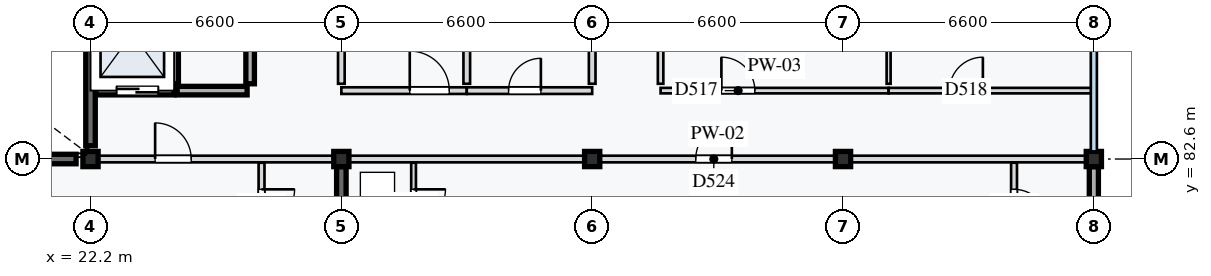
"""IFC4 building model, lengths in metres.
Left out: names, types, materials, properties, quantities, classifications, styles, units other than length and angle.
Written with IfcOpenShell. Run it as: python <this file> out.ifc"""

import sys

from ifc_helpers import new_model, si_unit, direction, frame, frame_2d, origin, origin_2d, place, context, subcontext, project, spatial, rectangle, extrude, element, fill, save


model = new_model("IFC4")
c1 = context("Model", 3, precision=1e-05, world=origin(), true_north=direction((0.0, 1.0)))
c2 = subcontext(c1, "Body", "Model", "MODEL_VIEW")
j1 = project(units=[si_unit("LENGTHUNIT", "METRE"), si_unit("PLANEANGLEUNIT", "RADIAN")], contexts=[c1])
p1 = place(None, origin())
s1 = spatial("IfcSite", under=j1, at=p1, CompositionType="ELEMENT")
p2 = place(p1, origin())
s2 = spatial("IfcBuilding", under=s1, at=p2, CompositionType="ELEMENT")
p3 = place(p2, frame((0.0, 0.0, 53.2)))
s3 = spatial("IfcBuildingStorey", under=s2, at=p3, CompositionType="ELEMENT", Elevation=53.2)
for number, where, z_axis, x_axis in (
    (1, (22.2, 82.6, 0.0), (0.0, 0.0, 1.0), (1.0, 0.0, 0.0)),
    (2, (28.8, 82.6, 0.0), (0.0, 0.0, 1.0), (1.0, 0.0, 0.0)),
    (3, (35.4, 82.6, 0.0), (0.0, 0.0, 1.0), (1.0, 0.0, 0.0)),
    (4, (42.0, 82.6, 0.0), (0.0, 0.0, 1.0), (1.0, 0.0, 0.0)),
    (5, (48.6, 82.6, 0.0), (0.0, 0.0, 1.0), (1.0, 0.0, 0.0)),
):
    element("IfcColumn", number, at=place(p3, frame(where, z_axis=z_axis, x_axis=x_axis)), inside=s3, PredefinedType="COLUMN", context=c2, shape_type="SweptSolid", body=[
        extrude(rectangle(XDim=0.4, YDim=0.4, at=origin_2d()), origin(), (0.0, 0.0, 1.0), 3.2),
    ])
p4 = place(p3, frame((15.98, 82.6, 0.0), z_axis=(0.0, 0.0, 1.0), x_axis=(1.0, 0.0, 0.0)))
e6 = element("IfcWall", 6, at=p4, inside=s3, PredefinedType="SHEAR", context=c2, shape_type="SweptSolid", body=[
    extrude(rectangle(XDim=5.84, YDim=0.25, at=frame_2d((2.92, 0.0))), origin(), (0.0, 0.0, 1.0), 2.98),
])
p5 = place(p3, frame((22.2, 82.95, 0.0), z_axis=(0.0, 0.0, 1.0), x_axis=(0.0, 1.0, 0.0)))
e7 = element("IfcWall", 7, at=p5, inside=s3, PredefinedType="SHEAR", context=c2, shape_type="SweptSolid", body=[
    extrude(rectangle(XDim=2.8, YDim=0.25, at=frame_2d((1.4, 0.0))), origin(), (0.0, 0.0, 1.0), 2.98),
])
p6 = place(p3, frame((28.8, 76.2, 0.0), z_axis=(0.0, 0.0, 1.0), x_axis=(0.0, 1.0, 0.0)))
e8 = element("IfcWall", 8, at=p6, inside=s3, PredefinedType="SHEAR", context=c2, shape_type="SweptSolid", body=[
    extrude(rectangle(XDim=6.2, YDim=0.25, at=frame_2d((3.1, 0.0))), origin(), (0.0, 0.0, 1.0), 2.98),
])
p7 = place(p3, frame((48.6, 76.2, 0.0), z_axis=(0.0, 0.0, 1.0), x_axis=(0.0, 1.0, 0.0)))
e9 = element("IfcWall", 9, at=p7, inside=s3, PredefinedType="STANDARD", context=c2, shape_type="SweptSolid", body=[
    extrude(rectangle(XDim=6.2, YDim=0.24, at=frame_2d((3.1, 0.0))), origin(), (0.0, 0.0, 1.0), 2.65),
])
p8 = place(p3, frame((22.335, 84.4, 0.0), z_axis=(0.0, 0.0, 1.0), x_axis=(1.0, 0.0, 0.0)))
e10 = element("IfcWall", 10, at=p8, inside=s3, PredefinedType="STANDARD", context=c2, shape_type="SweptSolid", body=[
    extrude(rectangle(XDim=2.065, YDim=0.225, at=frame_2d((1.032, 0.0))), origin(), (0.0, 0.0, 1.0), 2.945),
])
p9 = place(p8, frame((0.55, 0.0, 0.0)))
e11 = element("IfcOpeningElement", 11, at=p9, cuts=e10, PredefinedType="OPENING", context=c2, shape_type="SweptSolid", body=[
    extrude(rectangle(XDim=1.1, YDim=2.1, at=frame_2d((0.55, 1.05))), frame((0.0, 0.123, 0.0), z_axis=(0.0, -1.0, 0.0), x_axis=(1.0, 0.0, 0.0)), (0.0, 0.0, 1.0), 0.245),
])
p10 = place(p3, frame((24.48, 84.4, 0.0), z_axis=(0.0, 0.0, 1.0), x_axis=(1.0, 0.0, 0.0)))
e12 = element("IfcWall", 12, at=p10, inside=s3, PredefinedType="STANDARD", context=c2, shape_type="SweptSolid", body=[
    extrude(rectangle(XDim=1.84, YDim=0.225, at=frame_2d((0.92, 0.0))), origin(), (0.0, 0.0, 1.0), 2.945),
])
for number, where, z_axis, x_axis in (
    (13, (24.4, 84.58, 0.0), (0.0, 0.0, 1.0), (0.0, 1.0, 0.0)),
    (14, (26.4, 84.58, 0.0), (0.0, 0.0, 1.0), (0.0, 1.0, 0.0)),
):
    element("IfcWall", number, at=place(p3, frame(where, z_axis=z_axis, x_axis=x_axis)), inside=s3, PredefinedType="STANDARD", context=c2, shape_type="SweptSolid", body=[
        extrude(rectangle(XDim=2.64, YDim=0.225, at=frame_2d((1.32, 0.0))), origin(), (0.0, 0.0, 1.0), 2.945),
    ])
p11 = place(p3, frame((28.8, 84.4, 0.0), z_axis=(0.0, 0.0, 1.0), x_axis=(1.0, 0.0, 0.0)))
e15 = element("IfcWall", 15, at=p11, inside=s3, PredefinedType="PARTITIONING", context=c2, shape_type="SweptSolid", body=[
    extrude(rectangle(XDim=3.3, YDim=0.175, at=frame_2d((1.65, 0.0))), origin(), (0.0, 0.0, 1.0), 2.945),
])
p12 = place(p11, frame((1.8, 0.0, 0.0)))
e16 = element("IfcOpeningElement", 16, at=p12, cuts=e15, PredefinedType="OPENING", context=c2, shape_type="SweptSolid", body=[
    extrude(rectangle(XDim=1.04, YDim=2.12, at=frame_2d((0.52, 1.06))), frame((0.0, 0.097, 0.0), z_axis=(0.0, -1.0, 0.0), x_axis=(1.0, 0.0, 0.0)), (0.0, 0.0, 1.0), 0.195),
])
p13 = place(p3, frame((32.1, 84.4, 0.0), z_axis=(0.0, 0.0, 1.0), x_axis=(1.0, 0.0, 0.0)))
e17 = element("IfcWall", 17, at=p13, inside=s3, PredefinedType="PARTITIONING", context=c2, shape_type="SweptSolid", body=[
    extrude(rectangle(XDim=3.3, YDim=0.175, at=frame_2d((1.65, 0.0))), origin(), (0.0, 0.0, 1.0), 2.945),
])
p14 = place(p13, frame((1.1, 0.0, 0.0)))
e18 = element("IfcOpeningElement", 18, at=p14, cuts=e17, PredefinedType="OPENING", context=c2, shape_type="SweptSolid", body=[
    extrude(rectangle(XDim=0.85, YDim=2.0, at=frame_2d((0.425, 1.0))), frame((0.0, 0.097, 0.0), z_axis=(0.0, -1.0, 0.0), x_axis=(1.0, 0.0, 0.0)), (0.0, 0.0, 1.0), 0.195),
])
for number, where, z_axis, x_axis in (
    (19, (28.8, 84.58, 0.0), (0.0, 0.0, 1.0), (0.0, 1.0, 0.0)),
    (20, (32.1, 84.58, 0.0), (0.0, 0.0, 1.0), (0.0, 1.0, 0.0)),
    (21, (35.4, 84.58, 0.0), (0.0, 0.0, 1.0), (0.0, 1.0, 0.0)),
):
    element("IfcWall", number, at=place(p3, frame(where, z_axis=z_axis, x_axis=x_axis)), inside=s3, PredefinedType="PARTITIONING", context=c2, shape_type="SweptSolid", body=[
        extrude(rectangle(XDim=1.14, YDim=0.175, at=frame_2d((0.57, 0.0))), origin(), (0.0, 0.0, 1.0), 2.945),
    ])
p15 = place(p3, frame((37.2, 84.4, 0.0), z_axis=(0.0, 0.0, 1.0), x_axis=(1.0, 0.0, 0.0)))
e22 = element("IfcWall", 22, at=p15, inside=s3, PredefinedType="PARTITIONING", context=c2, shape_type="SweptSolid", body=[
    extrude(rectangle(XDim=6.0, YDim=0.145, at=frame_2d((3.0, 0.0))), origin(), (0.0, 0.0, 1.0), 2.945),
])
p16 = place(p15, frame((1.6, 0.0, 0.0)))
e23 = element("IfcOpeningElement", 23, at=p16, cuts=e22, PredefinedType="OPENING", context=c2, shape_type="SweptSolid", body=[
    extrude(rectangle(XDim=0.88, YDim=2.1, at=frame_2d((0.44, 1.05))), frame((0.0, 0.083, 0.0), z_axis=(0.0, -1.0, 0.0), x_axis=(1.0, 0.0, 0.0)), (0.0, 0.0, 1.0), 0.165),
])
p17 = place(p3, frame((43.2, 84.4, 0.0), z_axis=(0.0, 0.0, 1.0), x_axis=(1.0, 0.0, 0.0)))
e24 = element("IfcWall", 24, at=p17, inside=s3, PredefinedType="PARTITIONING", context=c2, shape_type="SweptSolid", body=[
    extrude(rectangle(XDim=5.4, YDim=0.145, at=frame_2d((2.7, 0.0))), origin(), (0.0, 0.0, 1.0), 2.945),
])
p18 = place(p17, frame((1.6, 0.0, 0.0)))
e25 = element("IfcOpeningElement", 25, at=p18, cuts=e24, PredefinedType="OPENING", context=c2, shape_type="SweptSolid", body=[
    extrude(rectangle(XDim=0.88, YDim=2.16, at=frame_2d((0.44, 1.08))), frame((0.0, 0.083, 0.0), z_axis=(0.0, -1.0, 0.0), x_axis=(1.0, 0.0, 0.0)), (0.0, 0.0, 1.0), 0.165),
])
p19 = place(p3, frame((43.2, 84.58, 0.0), z_axis=(0.0, 0.0, 1.0), x_axis=(0.0, 1.0, 0.0)))
e26 = element("IfcWall", 26, at=p19, inside=s3, PredefinedType="PARTITIONING", context=c2, shape_type="SweptSolid", body=[
    extrude(rectangle(XDim=2.64, YDim=0.105, at=frame_2d((1.32, 0.0))), origin(), (0.0, 0.0, 1.0), 2.945),
])
p20 = place(p3, frame((37.2, 84.58, 0.0), z_axis=(0.0, 0.0, 1.0), x_axis=(0.0, 1.0, 0.0)))
e27 = element("IfcWall", 27, at=p20, inside=s3, PredefinedType="PARTITIONING", context=c2, shape_type="SweptSolid", body=[
    extrude(rectangle(XDim=2.64, YDim=0.145, at=frame_2d((1.32, 0.0))), origin(), (0.0, 0.0, 1.0), 2.945),
])
p21 = place(p3, frame((22.2, 82.6, 0.0), z_axis=(0.0, 0.0, 1.0), x_axis=(1.0, 0.0, 0.0)))
e28 = element("IfcWall", 28, at=p21, inside=s3, PredefinedType="PARTITIONING", context=c2, shape_type="SweptSolid", body=[
    extrude(rectangle(XDim=6.6, YDim=0.175, at=frame_2d((3.3, 0.0))), origin(), (0.0, 0.0, 1.0), 2.7),
])
p22 = place(p21, frame((1.7, 0.0, 0.0)))
e29 = element("IfcOpeningElement", 29, at=p22, cuts=e28, PredefinedType="OPENING", context=c2, shape_type="SweptSolid", body=[
    extrude(rectangle(XDim=0.95, YDim=2.1, at=frame_2d((0.475, 1.05))), frame((0.0, 0.097, 0.0), z_axis=(0.0, -1.0, 0.0), x_axis=(1.0, 0.0, 0.0)), (0.0, 0.0, 1.0), 0.195),
])
p23 = place(p3, frame((26.7, 82.502, 0.0), z_axis=(0.0, 0.0, 1.0), x_axis=(0.0, -1.0, 0.0)))
e30 = element("IfcWall", 30, at=p23, inside=s3, PredefinedType="PARTITIONING", context=c2, shape_type="SweptSolid", body=[
    extrude(rectangle(XDim=2.302, YDim=0.155, at=frame_2d((1.151, 0.0))), origin(), (0.0, 0.0, 1.0), 2.945),
])
p24 = place(p23, frame((0.7, 0.0, 0.0)))
e31 = element("IfcOpeningElement", 31, at=p24, cuts=e30, PredefinedType="OPENING", context=c2, shape_type="SweptSolid", body=[
    extrude(rectangle(XDim=0.87, YDim=2.08, at=frame_2d((0.435, 1.04))), frame((0.0, 0.087, 0.0), z_axis=(0.0, -1.0, 0.0), x_axis=(1.0, 0.0, 0.0)), (0.0, 0.0, 1.0), 0.175),
])
p25 = place(p3, frame((28.8, 82.6, 0.0), z_axis=(0.0, 0.0, 1.0), x_axis=(1.0, 0.0, 0.0)))
e32 = element("IfcWall", 32, at=p25, inside=s3, PredefinedType="PARTITIONING", context=c2, shape_type="SweptSolid", body=[
    extrude(rectangle(XDim=19.8, YDim=0.175, at=frame_2d((9.9, 0.0))), origin(), (0.0, 0.0, 1.0), 2.7),
])
p26 = place(p25, frame((9.325, 0.0, 0.0)))
e33 = element("IfcOpeningElement", 33, at=p26, cuts=e32, PredefinedType="OPENING", context=c2, shape_type="SweptSolid", body=[
    extrude(rectangle(XDim=0.95, YDim=2.16, at=frame_2d((0.475, 1.08))), frame((0.0, 0.097, 0.0), z_axis=(0.0, -1.0, 0.0), x_axis=(1.0, 0.0, 0.0)), (0.0, 0.0, 1.0), 0.195),
])
p27 = place(p3, frame((30.7, 82.502, 0.0), z_axis=(0.0, 0.0, 1.0), x_axis=(0.0, -1.0, 0.0)))
e34 = element("IfcWall", 34, at=p27, inside=s3, PredefinedType="PARTITIONING", context=c2, shape_type="SweptSolid", body=[
    extrude(rectangle(XDim=2.302, YDim=0.125, at=frame_2d((1.151, 0.0))), origin(), (0.0, 0.0, 1.0), 2.945),
])
p28 = place(p27, frame((0.7, 0.0, 0.0)))
e35 = element("IfcOpeningElement", 35, at=p28, cuts=e34, PredefinedType="OPENING", context=c2, shape_type="SweptSolid", body=[
    extrude(rectangle(XDim=0.84, YDim=2.06, at=frame_2d((0.42, 1.03))), frame((0.0, 0.073, 0.0), z_axis=(0.0, -1.0, 0.0), x_axis=(1.0, 0.0, 0.0)), (0.0, 0.0, 1.0), 0.145),
])
p29 = place(p3, frame((46.5, 82.502, 0.0), z_axis=(0.0, 0.0, 1.0), x_axis=(0.0, -1.0, 0.0)))
e36 = element("IfcWall", 36, at=p29, inside=s3, PredefinedType="PARTITIONING", context=c2, shape_type="SweptSolid", body=[
    extrude(rectangle(XDim=2.302, YDim=0.155, at=frame_2d((1.151, 0.0))), origin(), (0.0, 0.0, 1.0), 2.945),
])
p30 = place(p29, frame((0.7, 0.0, 0.0)))
e37 = element("IfcOpeningElement", 37, at=p30, cuts=e36, PredefinedType="OPENING", context=c2, shape_type="SweptSolid", body=[
    extrude(rectangle(XDim=0.88, YDim=2.1, at=frame_2d((0.44, 1.05))), frame((0.0, 0.087, 0.0), z_axis=(0.0, -1.0, 0.0), x_axis=(1.0, 0.0, 0.0)), (0.0, 0.0, 1.0), 0.175),
])
p31 = place(p9, origin())
e38 = element("IfcDoor", 38, at=p31, inside=s3, OperationType="DOUBLE_DOOR_SLIDING", PredefinedType="DOOR", context=c2, shape_type="SweptSolid", body=[
    extrude(rectangle(XDim=1.1, YDim=2.1, at=frame_2d((0.55, 1.05))), frame((0.0, 0.025, 0.0), z_axis=(0.0, -1.0, 0.0), x_axis=(1.0, 0.0, 0.0)), (0.0, 0.0, 1.0), 0.05),
])
fill(e11, e38)
p32 = place(p12, origin())
e39 = element("IfcDoor", 39, at=p32, inside=s3, OperationType="SINGLE_SWING_LEFT", PredefinedType="DOOR", context=c2, shape_type="SweptSolid", body=[
    extrude(rectangle(XDim=1.04, YDim=2.12, at=frame_2d((0.52, 1.06))), frame((0.0, 0.025, 0.0), z_axis=(0.0, -1.0, 0.0), x_axis=(1.0, 0.0, 0.0)), (0.0, 0.0, 1.0), 0.05),
])
fill(e16, e39)
p33 = place(p14, origin())
e40 = element("IfcDoor", 40, at=p33, inside=s3, OperationType="SINGLE_SWING_RIGHT", PredefinedType="DOOR", context=c2, shape_type="SweptSolid", body=[
    extrude(rectangle(XDim=0.85, YDim=2.0, at=frame_2d((0.425, 1.0))), frame((0.0, 0.025, 0.0), z_axis=(0.0, -1.0, 0.0), x_axis=(1.0, 0.0, 0.0)), (0.0, 0.0, 1.0), 0.05),
])
fill(e18, e40)
p34 = place(p16, origin())
e41 = element("IfcDoor", 41, at=p34, inside=s3, OperationType="SINGLE_SWING_LEFT", PredefinedType="DOOR", context=c2, shape_type="SweptSolid", body=[
    extrude(rectangle(XDim=0.88, YDim=2.1, at=frame_2d((0.44, 1.05))), frame((0.0, 0.025, 0.0), z_axis=(0.0, -1.0, 0.0), x_axis=(1.0, 0.0, 0.0)), (0.0, 0.0, 1.0), 0.05),
])
fill(e23, e41)
p35 = place(p18, origin())
e42 = element("IfcDoor", 42, at=p35, inside=s3, OperationType="SINGLE_SWING_RIGHT", PredefinedType="DOOR", context=c2, shape_type="SweptSolid", body=[
    extrude(rectangle(XDim=0.88, YDim=2.16, at=frame_2d((0.44, 1.08))), frame((0.0, 0.025, 0.0), z_axis=(0.0, -1.0, 0.0), x_axis=(1.0, 0.0, 0.0)), (0.0, 0.0, 1.0), 0.05),
])
fill(e25, e42)
p36 = place(p22, origin())
e43 = element("IfcDoor", 43, at=p36, inside=s3, OperationType="SINGLE_SWING_LEFT", PredefinedType="DOOR", context=c2, shape_type="SweptSolid", body=[
    extrude(rectangle(XDim=0.95, YDim=2.1, at=frame_2d((0.475, 1.05))), frame((0.0, 0.025, 0.0), z_axis=(0.0, -1.0, 0.0), x_axis=(1.0, 0.0, 0.0)), (0.0, 0.0, 1.0), 0.05),
])
fill(e29, e43)
p37 = place(p24, origin())
e44 = element("IfcDoor", 44, at=p37, inside=s3, OperationType="SINGLE_SWING_LEFT", PredefinedType="DOOR", context=c2, shape_type="SweptSolid", body=[
    extrude(rectangle(XDim=0.87, YDim=2.08, at=frame_2d((0.435, 1.04))), frame((0.0, 0.025, 0.0), z_axis=(0.0, -1.0, 0.0), x_axis=(1.0, 0.0, 0.0)), (0.0, 0.0, 1.0), 0.05),
])
fill(e31, e44)
p38 = place(p26, origin())
e45 = element("IfcDoor", 45, at=p38, inside=s3, OperationType="SINGLE_SWING_RIGHT", PredefinedType="DOOR", context=c2, shape_type="SweptSolid", body=[
    extrude(rectangle(XDim=0.95, YDim=2.16, at=frame_2d((0.475, 1.08))), frame((0.0, 0.025, 0.0), z_axis=(0.0, -1.0, 0.0), x_axis=(1.0, 0.0, 0.0)), (0.0, 0.0, 1.0), 0.05),
])
fill(e33, e45)
p39 = place(p28, origin())
e46 = element("IfcDoor", 46, at=p39, inside=s3, OperationType="SINGLE_SWING_LEFT", PredefinedType="DOOR", context=c2, shape_type="SweptSolid", body=[
    extrude(rectangle(XDim=0.84, YDim=2.06, at=frame_2d((0.42, 1.03))), frame((0.0, 0.025, 0.0), z_axis=(0.0, -1.0, 0.0), x_axis=(1.0, 0.0, 0.0)), (0.0, 0.0, 1.0), 0.05),
])
fill(e35, e46)
p40 = place(p30, origin())
e47 = element("IfcDoor", 47, at=p40, inside=s3, OperationType="SINGLE_SWING_RIGHT", PredefinedType="DOOR", context=c2, shape_type="SweptSolid", body=[
    extrude(rectangle(XDim=0.88, YDim=2.1, at=frame_2d((0.44, 1.05))), frame((0.0, 0.025, 0.0), z_axis=(0.0, -1.0, 0.0), x_axis=(1.0, 0.0, 0.0)), (0.0, 0.0, 1.0), 0.05),
])
fill(e37, e47)
save(model, sys.argv[1])
